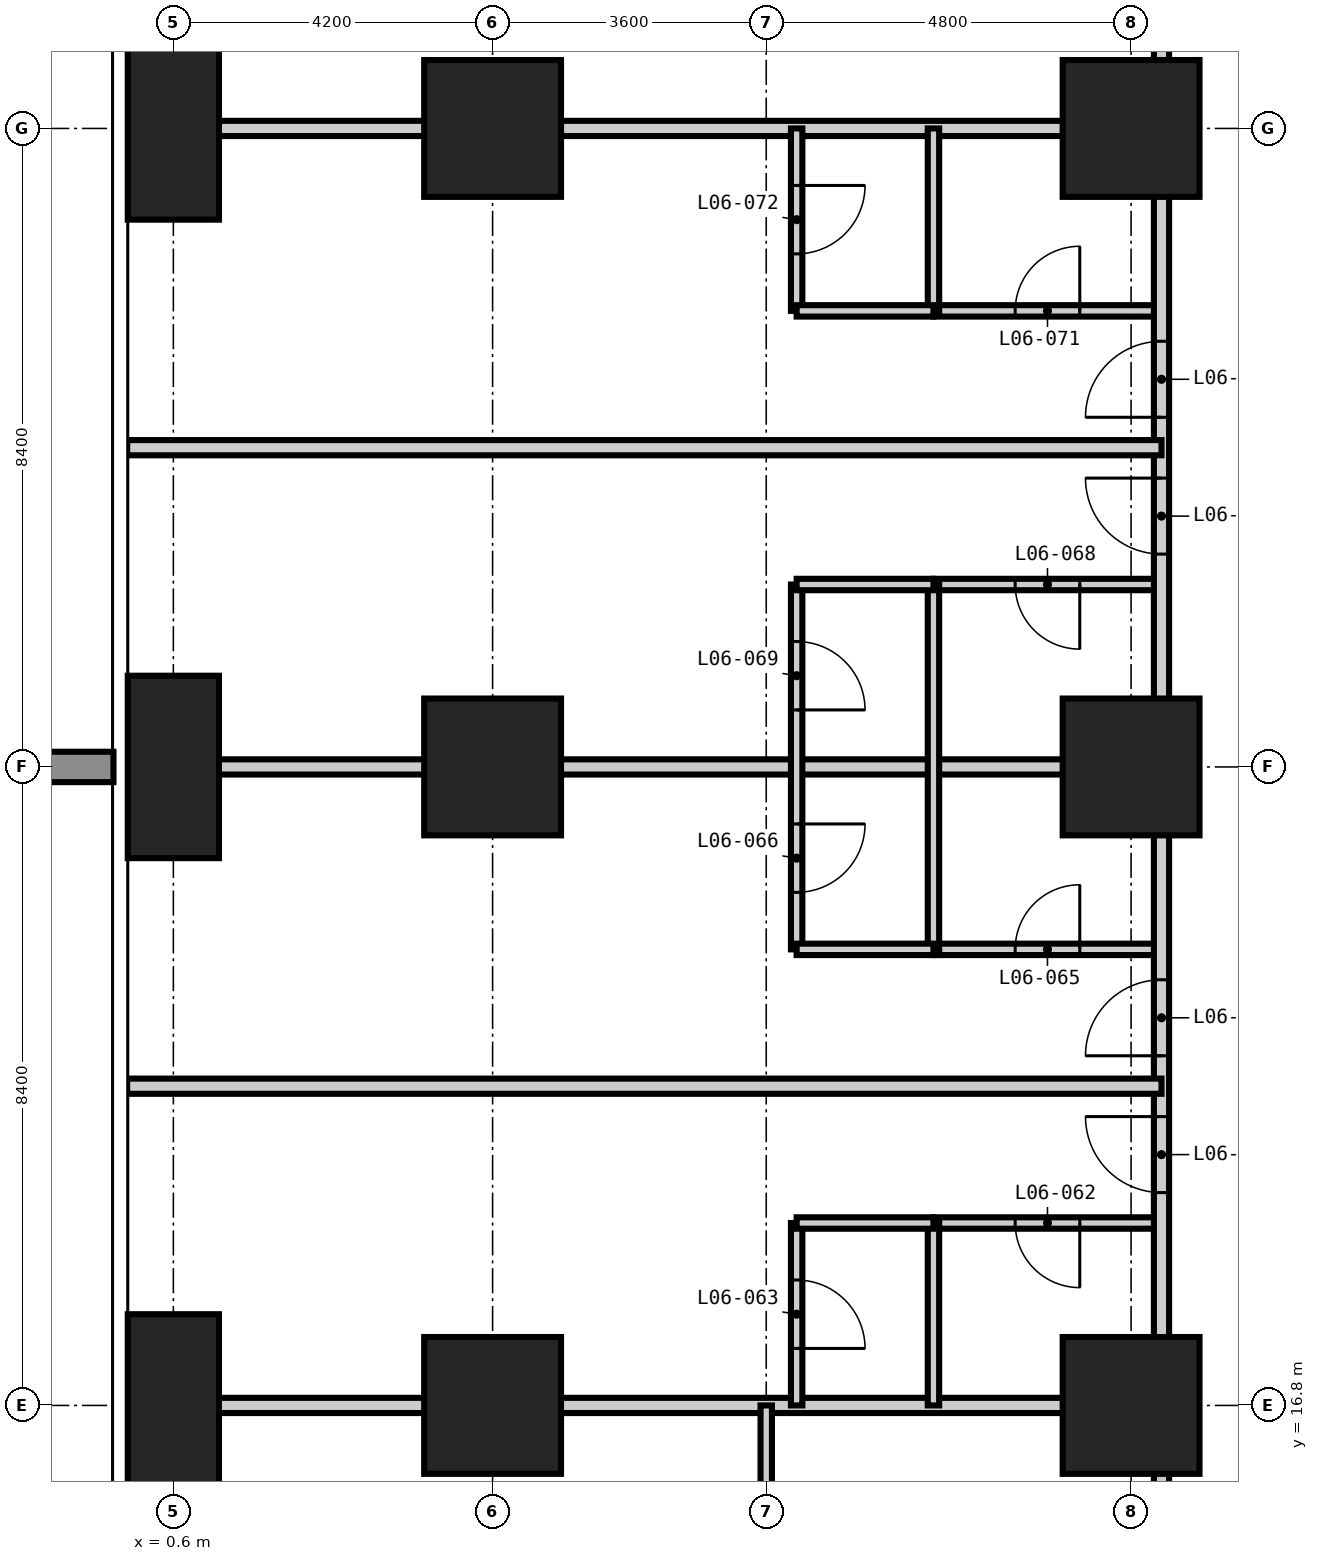
"""IFC4 building model, lengths in metres.
Left out: names, types, materials, properties, quantities, classifications, styles, units other than length and angle.
Written with IfcOpenShell. Run it as: python <this file> out.ifc"""

import sys

from ifc_helpers import new_model, si_unit, direction, frame, frame_2d, origin, origin_2d, place, context, subcontext, project, spatial, rectangle, extrude, element, fill, save


model = new_model("IFC4")
c1 = context("Model", 3, precision=1e-05, world=origin(), true_north=direction((0.0, 1.0)))
c2 = subcontext(c1, "Body", "Model", "MODEL_VIEW")
j1 = project(units=[si_unit("LENGTHUNIT", "METRE"), si_unit("PLANEANGLEUNIT", "RADIAN")], contexts=[c1])
p1 = place(None, origin())
s1 = spatial("IfcSite", under=j1, at=p1, CompositionType="ELEMENT")
p2 = place(p1, origin())
s2 = spatial("IfcBuilding", under=s1, at=p2, CompositionType="ELEMENT")
p3 = place(p2, frame((0.0, 0.0, 30.6)))
s3 = spatial("IfcBuildingStorey", under=s2, at=p3, CompositionType="ELEMENT", Elevation=30.6)
for number, where, z_axis, x_axis in (
    (1, (0.6, 16.8, -0.35), (0.0, 0.0, 1.0), (1.0, 0.0, 0.0)),
    (2, (0.6, 25.2, -0.35), (0.0, 0.0, 1.0), (1.0, 0.0, 0.0)),
    (3, (0.6, 33.6, -0.35), (0.0, 0.0, 1.0), (1.0, 0.0, 0.0)),
):
    element("IfcColumn", number, at=place(p3, frame(where, z_axis=z_axis, x_axis=x_axis)), inside=s3, PredefinedType="COLUMN", context=c2, shape_type="SweptSolid", body=[
        extrude(rectangle(XDim=1.2, YDim=2.4, at=origin_2d()), origin(), (0.0, 0.0, 1.0), 3.6),
    ])
for number, where, z_axis, x_axis in (
    (4, (4.8, 16.8, -0.35), (0.0, 0.0, 1.0), (1.0, 0.0, 0.0)),
    (5, (4.8, 25.2, -0.35), (0.0, 0.0, 1.0), (1.0, 0.0, 0.0)),
    (6, (4.8, 33.6, -0.35), (0.0, 0.0, 1.0), (1.0, 0.0, 0.0)),
    (7, (13.2, 16.8, -0.35), (0.0, 0.0, 1.0), (1.0, 0.0, 0.0)),
    (8, (13.2, 25.2, -0.35), (0.0, 0.0, 1.0), (1.0, 0.0, 0.0)),
    (9, (13.2, 33.6, -0.35), (0.0, 0.0, 1.0), (1.0, 0.0, 0.0)),
):
    element("IfcColumn", number, at=place(p3, frame(where, z_axis=z_axis, x_axis=x_axis)), inside=s3, PredefinedType="COLUMN", context=c2, shape_type="SweptSolid", body=[
        extrude(rectangle(XDim=1.8, YDim=1.8, at=origin_2d()), origin(), (0.0, 0.0, 1.0), 3.6),
    ])
p4 = place(p3, frame((10.6, 19.2, 0.0), z_axis=(0.0, 0.0, 1.0), x_axis=(1.0, 0.0, 0.0)))
e10 = element("IfcWall", 10, at=p4, inside=s3, PredefinedType="PARTITIONING", context=c2, shape_type="SweptSolid", body=[
    extrude(rectangle(XDim=3.0, YDim=0.15, at=frame_2d((1.5, 0.0))), origin(), (0.0, 0.0, 1.0), 3.25),
])
p5 = place(p4, frame((1.075, 0.0, 0.0)))
e11 = element("IfcOpeningElement", 11, at=p5, cuts=e10, PredefinedType="OPENING", context=c2, shape_type="SweptSolid", body=[
    extrude(rectangle(XDim=0.85, YDim=2.1, at=frame_2d((0.425, 1.05))), frame((0.0, 0.085, 0.0), z_axis=(0.0, -1.0, 0.0), x_axis=(1.0, 0.0, 0.0)), (0.0, 0.0, 1.0), 0.17),
])
p6 = place(p3, frame((10.6, 22.8, 0.0), z_axis=(0.0, 0.0, 1.0), x_axis=(1.0, 0.0, 0.0)))
e12 = element("IfcWall", 12, at=p6, inside=s3, PredefinedType="PARTITIONING", context=c2, shape_type="SweptSolid", body=[
    extrude(rectangle(XDim=3.0, YDim=0.15, at=frame_2d((1.5, 0.0))), origin(), (0.0, 0.0, 1.0), 3.25),
])
p7 = place(p6, frame((1.075, 0.0, 0.0)))
e13 = element("IfcOpeningElement", 13, at=p7, cuts=e12, PredefinedType="OPENING", context=c2, shape_type="SweptSolid", body=[
    extrude(rectangle(XDim=0.85, YDim=2.1, at=frame_2d((0.425, 1.05))), frame((0.0, 0.085, 0.0), z_axis=(0.0, -1.0, 0.0), x_axis=(1.0, 0.0, 0.0)), (0.0, 0.0, 1.0), 0.17),
])
p8 = place(p3, frame((10.6, 27.6, 0.0), z_axis=(0.0, 0.0, 1.0), x_axis=(1.0, 0.0, 0.0)))
e14 = element("IfcWall", 14, at=p8, inside=s3, PredefinedType="PARTITIONING", context=c2, shape_type="SweptSolid", body=[
    extrude(rectangle(XDim=3.0, YDim=0.15, at=frame_2d((1.5, 0.0))), origin(), (0.0, 0.0, 1.0), 3.25),
])
p9 = place(p8, frame((1.075, 0.0, 0.0)))
e15 = element("IfcOpeningElement", 15, at=p9, cuts=e14, PredefinedType="OPENING", context=c2, shape_type="SweptSolid", body=[
    extrude(rectangle(XDim=0.85, YDim=2.1, at=frame_2d((0.425, 1.05))), frame((0.0, 0.085, 0.0), z_axis=(0.0, -1.0, 0.0), x_axis=(1.0, 0.0, 0.0)), (0.0, 0.0, 1.0), 0.17),
])
p10 = place(p3, frame((10.6, 31.2, 0.0), z_axis=(0.0, 0.0, 1.0), x_axis=(1.0, 0.0, 0.0)))
e16 = element("IfcWall", 16, at=p10, inside=s3, PredefinedType="PARTITIONING", context=c2, shape_type="SweptSolid", body=[
    extrude(rectangle(XDim=3.0, YDim=0.15, at=frame_2d((1.5, 0.0))), origin(), (0.0, 0.0, 1.0), 3.25),
])
p11 = place(p10, frame((1.075, 0.0, 0.0)))
e17 = element("IfcOpeningElement", 17, at=p11, cuts=e16, PredefinedType="OPENING", context=c2, shape_type="SweptSolid", body=[
    extrude(rectangle(XDim=0.85, YDim=2.1, at=frame_2d((0.425, 1.05))), frame((0.0, 0.085, 0.0), z_axis=(0.0, -1.0, 0.0), x_axis=(1.0, 0.0, 0.0)), (0.0, 0.0, 1.0), 0.17),
])
p12 = place(p3, frame((13.6, 13.6, 0.0), z_axis=(0.0, 0.0, 1.0), x_axis=(0.0, 1.0, 0.0)))
e18 = element("IfcWall", 18, at=p12, inside=s3, PredefinedType="PARTITIONING", context=c2, shape_type="SweptSolid", body=[
    extrude(rectangle(XDim=20.0, YDim=0.2, at=frame_2d((10.0, 0.0))), origin(), (0.0, 0.0, 1.0), 3.25),
])
p13 = place(p12, frame((6.0, 0.0, 0.0)))
e19 = element("IfcOpeningElement", 19, at=p13, cuts=e18, PredefinedType="OPENING", context=c2, shape_type="SweptSolid", body=[
    extrude(rectangle(XDim=1.0, YDim=2.2, at=frame_2d((0.5, 1.1))), frame((0.0, 0.11, 0.0), z_axis=(0.0, -1.0, 0.0), x_axis=(1.0, 0.0, 0.0)), (0.0, 0.0, 1.0), 0.22),
])
p14 = place(p12, frame((7.8, 0.0, 0.0)))
e20 = element("IfcOpeningElement", 20, at=p14, cuts=e18, PredefinedType="OPENING", context=c2, shape_type="SweptSolid", body=[
    extrude(rectangle(XDim=1.0, YDim=2.2, at=frame_2d((0.5, 1.1))), frame((0.0, 0.11, 0.0), z_axis=(0.0, -1.0, 0.0), x_axis=(1.0, 0.0, 0.0)), (0.0, 0.0, 1.0), 0.22),
])
p15 = place(p12, frame((14.4, 0.0, 0.0)))
e21 = element("IfcOpeningElement", 21, at=p15, cuts=e18, PredefinedType="OPENING", context=c2, shape_type="SweptSolid", body=[
    extrude(rectangle(XDim=1.0, YDim=2.2, at=frame_2d((0.5, 1.1))), frame((0.0, 0.11, 0.0), z_axis=(0.0, -1.0, 0.0), x_axis=(1.0, 0.0, 0.0)), (0.0, 0.0, 1.0), 0.22),
])
p16 = place(p12, frame((16.2, 0.0, 0.0)))
e22 = element("IfcOpeningElement", 22, at=p16, cuts=e18, PredefinedType="OPENING", context=c2, shape_type="SweptSolid", body=[
    extrude(rectangle(XDim=1.0, YDim=2.2, at=frame_2d((0.5, 1.1))), frame((0.0, 0.11, 0.0), z_axis=(0.0, -1.0, 0.0), x_axis=(1.0, 0.0, 0.0)), (0.0, 0.0, 1.0), 0.22),
])
p17 = place(p12, frame((1.1, 0.0, 0.0)))
e23 = element("IfcOpeningElement", 23, at=p17, cuts=e18, PredefinedType="OPENING", context=c2, shape_type="SweptSolid", body=[
    extrude(rectangle(XDim=1.0, YDim=2.2, at=frame_2d((0.5, 1.1))), frame((0.0, 0.11, 0.0), z_axis=(0.0, -1.0, 0.0), x_axis=(1.0, 0.0, 0.0)), (0.0, 0.0, 1.0), 0.22),
])
p18 = place(p3, frame((13.6, 42.0, 0.0), z_axis=(0.0, 0.0, 1.0), x_axis=(0.0, -1.0, 0.0)))
e24 = element("IfcWall", 24, at=p18, inside=s3, PredefinedType="PARTITIONING", context=c2, shape_type="SweptSolid", body=[
    extrude(rectangle(XDim=8.4, YDim=0.2, at=frame_2d((4.2, 0.0))), origin(), (0.0, 0.0, 1.0), 3.25),
])
p19 = place(p18, frame((3.3, 0.0, 0.0)))
e25 = element("IfcOpeningElement", 25, at=p19, cuts=e24, PredefinedType="OPENING", context=c2, shape_type="SweptSolid", body=[
    extrude(rectangle(XDim=1.8, YDim=2.4, at=frame_2d((0.9, 1.2))), frame((0.0, 0.11, 0.0), z_axis=(0.0, -1.0, 0.0), x_axis=(1.0, 0.0, 0.0)), (0.0, 0.0, 1.0), 0.22),
])
for number, where, z_axis, x_axis in (
    (26, (-0.008, 16.8, 0.0), (0.0, 0.0, 1.0), (1.0, 0.0, 0.0)),
    (27, (-0.008, 21.0, 0.0), (0.0, 0.0, 1.0), (1.0, 0.0, 0.0)),
    (28, (-0.008, 25.2, 0.0), (0.0, 0.0, 1.0), (1.0, 0.0, 0.0)),
    (29, (-0.008, 29.4, 0.0), (0.0, 0.0, 1.0), (1.0, 0.0, 0.0)),
    (30, (-0.008, 33.6, 0.0), (0.0, 0.0, 1.0), (1.0, 0.0, 0.0)),
):
    element("IfcWall", number, at=place(p3, frame(where, z_axis=z_axis, x_axis=x_axis)), inside=s3, PredefinedType="PARTITIONING", context=c2, shape_type="SweptSolid", body=[
        extrude(rectangle(XDim=13.608, YDim=0.2, at=frame_2d((6.804, 0.0))), origin(), (0.0, 0.0, 1.0), 3.25),
    ])
p20 = place(p3, frame((8.4, -0.008, 0.0), z_axis=(0.0, 0.0, 1.0), x_axis=(0.0, 1.0, 0.0)))
e31 = element("IfcWall", 31, at=p20, inside=s3, PredefinedType="PARTITIONING", context=c2, shape_type="SweptSolid", body=[
    extrude(rectangle(XDim=16.808, YDim=0.15, at=frame_2d((8.404, 0.0))), origin(), (0.0, 0.0, 1.0), 3.25),
])
p21 = place(p20, frame((1.958, 0.0, 0.0)))
e32 = element("IfcOpeningElement", 32, at=p21, cuts=e31, PredefinedType="OPENING", context=c2, shape_type="SweptSolid", body=[
    extrude(rectangle(XDim=0.9, YDim=2.1, at=frame_2d((0.45, 1.05))), frame((0.0, 0.085, 0.0), z_axis=(0.0, -1.0, 0.0), x_axis=(1.0, 0.0, 0.0)), (0.0, 0.0, 1.0), 0.17),
])
p22 = place(p20, frame((12.158, 0.0, 0.0)))
e33 = element("IfcOpeningElement", 33, at=p22, cuts=e31, PredefinedType="OPENING", context=c2, shape_type="SweptSolid", body=[
    extrude(rectangle(XDim=0.9, YDim=2.1, at=frame_2d((0.45, 1.05))), frame((0.0, 0.085, 0.0), z_axis=(0.0, -1.0, 0.0), x_axis=(1.0, 0.0, 0.0)), (0.0, 0.0, 1.0), 0.17),
])
p23 = place(p3, frame((8.8, 16.8, 0.0), z_axis=(0.0, 0.0, 1.0), x_axis=(0.0, 1.0, 0.0)))
e34 = element("IfcWall", 34, at=p23, inside=s3, PredefinedType="PARTITIONING", context=c2, shape_type="SweptSolid", body=[
    extrude(rectangle(XDim=2.4, YDim=0.15, at=frame_2d((1.2, 0.0))), origin(), (0.0, 0.0, 1.0), 3.25),
])
p24 = place(p23, frame((0.75, 0.0, 0.0)))
e35 = element("IfcOpeningElement", 35, at=p24, cuts=e34, PredefinedType="OPENING", context=c2, shape_type="SweptSolid", body=[
    extrude(rectangle(XDim=0.9, YDim=2.1, at=frame_2d((0.45, 1.05))), frame((0.0, 0.085, 0.0), z_axis=(0.0, -1.0, 0.0), x_axis=(1.0, 0.0, 0.0)), (0.0, 0.0, 1.0), 0.17),
])
p25 = place(p3, frame((8.8, 22.8, 0.0), z_axis=(0.0, 0.0, 1.0), x_axis=(0.0, 1.0, 0.0)))
e36 = element("IfcWall", 36, at=p25, inside=s3, PredefinedType="PARTITIONING", context=c2, shape_type="SweptSolid", body=[
    extrude(rectangle(XDim=4.8, YDim=0.15, at=frame_2d((2.4, 0.0))), origin(), (0.0, 0.0, 1.0), 3.25),
])
p26 = place(p25, frame((0.75, 0.0, 0.0)))
e37 = element("IfcOpeningElement", 37, at=p26, cuts=e36, PredefinedType="OPENING", context=c2, shape_type="SweptSolid", body=[
    extrude(rectangle(XDim=0.9, YDim=2.1, at=frame_2d((0.45, 1.05))), frame((0.0, 0.085, 0.0), z_axis=(0.0, -1.0, 0.0), x_axis=(1.0, 0.0, 0.0)), (0.0, 0.0, 1.0), 0.17),
])
p27 = place(p25, frame((3.15, 0.0, 0.0)))
e38 = element("IfcOpeningElement", 38, at=p27, cuts=e36, PredefinedType="OPENING", context=c2, shape_type="SweptSolid", body=[
    extrude(rectangle(XDim=0.9, YDim=2.1, at=frame_2d((0.45, 1.05))), frame((0.0, 0.085, 0.0), z_axis=(0.0, -1.0, 0.0), x_axis=(1.0, 0.0, 0.0)), (0.0, 0.0, 1.0), 0.17),
])
p28 = place(p3, frame((8.8, 31.2, 0.0), z_axis=(0.0, 0.0, 1.0), x_axis=(0.0, 1.0, 0.0)))
e39 = element("IfcWall", 39, at=p28, inside=s3, PredefinedType="PARTITIONING", context=c2, shape_type="SweptSolid", body=[
    extrude(rectangle(XDim=2.4, YDim=0.15, at=frame_2d((1.2, 0.0))), origin(), (0.0, 0.0, 1.0), 3.25),
])
p29 = place(p28, frame((0.75, 0.0, 0.0)))
e40 = element("IfcOpeningElement", 40, at=p29, cuts=e39, PredefinedType="OPENING", context=c2, shape_type="SweptSolid", body=[
    extrude(rectangle(XDim=0.9, YDim=2.1, at=frame_2d((0.45, 1.05))), frame((0.0, 0.085, 0.0), z_axis=(0.0, -1.0, 0.0), x_axis=(1.0, 0.0, 0.0)), (0.0, 0.0, 1.0), 0.17),
])
p30 = place(p3, frame((10.6, 16.8, 0.0), z_axis=(0.0, 0.0, 1.0), x_axis=(0.0, 1.0, 0.0)))
e41 = element("IfcWall", 41, at=p30, inside=s3, PredefinedType="PARTITIONING", context=c2, shape_type="SweptSolid", body=[
    extrude(rectangle(XDim=2.4, YDim=0.15, at=frame_2d((1.2, 0.0))), origin(), (0.0, 0.0, 1.0), 3.25),
])
p31 = place(p3, frame((10.6, 22.8, 0.0), z_axis=(0.0, 0.0, 1.0), x_axis=(0.0, 1.0, 0.0)))
e42 = element("IfcWall", 42, at=p31, inside=s3, PredefinedType="PARTITIONING", context=c2, shape_type="SweptSolid", body=[
    extrude(rectangle(XDim=4.8, YDim=0.15, at=frame_2d((2.4, 0.0))), origin(), (0.0, 0.0, 1.0), 3.25),
])
p32 = place(p3, frame((10.6, 31.2, 0.0), z_axis=(0.0, 0.0, 1.0), x_axis=(0.0, 1.0, 0.0)))
e43 = element("IfcWall", 43, at=p32, inside=s3, PredefinedType="PARTITIONING", context=c2, shape_type="SweptSolid", body=[
    extrude(rectangle(XDim=2.4, YDim=0.15, at=frame_2d((1.2, 0.0))), origin(), (0.0, 0.0, 1.0), 3.25),
])
for number, where, z_axis, x_axis in (
    (44, (8.8, 19.2, 0.0), (0.0, 0.0, 1.0), (1.0, 0.0, 0.0)),
    (45, (8.8, 22.8, 0.0), (0.0, 0.0, 1.0), (1.0, 0.0, 0.0)),
    (46, (8.8, 27.6, 0.0), (0.0, 0.0, 1.0), (1.0, 0.0, 0.0)),
    (47, (8.8, 31.2, 0.0), (0.0, 0.0, 1.0), (1.0, 0.0, 0.0)),
):
    element("IfcWall", number, at=place(p3, frame(where, z_axis=z_axis, x_axis=x_axis)), inside=s3, PredefinedType="PARTITIONING", context=c2, shape_type="SweptSolid", body=[
        extrude(rectangle(XDim=1.8, YDim=0.15, at=frame_2d((0.9, 0.0))), origin(), (0.0, 0.0, 1.0), 3.25),
    ])
p33 = place(p13, origin())
e48 = element("IfcDoor", 48, at=p33, inside=s3, OperationType="SINGLE_SWING_RIGHT", PredefinedType="DOOR", context=c2, shape_type="SweptSolid", body=[
    extrude(rectangle(XDim=1.0, YDim=2.2, at=frame_2d((0.5, 1.1))), frame((0.0, 0.025, 0.0), z_axis=(0.0, -1.0, 0.0), x_axis=(1.0, 0.0, 0.0)), (0.0, 0.0, 1.0), 0.05),
])
fill(e19, e48)
p34 = place(p5, frame((0.85, 0.0, 0.0), z_axis=(0.0, 0.0, 1.0), x_axis=(-1.0, 0.0, 0.0)))
e49 = element("IfcDoor", 49, at=p34, inside=s3, OperationType="SINGLE_SWING_LEFT", PredefinedType="DOOR", context=c2, shape_type="SweptSolid", body=[
    extrude(rectangle(XDim=0.85, YDim=2.1, at=frame_2d((0.425, 1.05))), frame((0.0, 0.025, 0.0), z_axis=(0.0, -1.0, 0.0), x_axis=(1.0, 0.0, 0.0)), (0.0, 0.0, 1.0), 0.05),
])
fill(e11, e49)
p35 = place(p24, frame((0.9, 0.0, 0.0), z_axis=(0.0, 0.0, 1.0), x_axis=(-1.0, 0.0, 0.0)))
e50 = element("IfcDoor", 50, at=p35, inside=s3, OperationType="SINGLE_SWING_RIGHT", PredefinedType="DOOR", context=c2, shape_type="SweptSolid", body=[
    extrude(rectangle(XDim=0.9, YDim=2.1, at=frame_2d((0.45, 1.05))), frame((0.0, 0.025, 0.0), z_axis=(0.0, -1.0, 0.0), x_axis=(1.0, 0.0, 0.0)), (0.0, 0.0, 1.0), 0.05),
])
fill(e35, e50)
p36 = place(p14, origin())
e51 = element("IfcDoor", 51, at=p36, inside=s3, OperationType="SINGLE_SWING_LEFT", PredefinedType="DOOR", context=c2, shape_type="SweptSolid", body=[
    extrude(rectangle(XDim=1.0, YDim=2.2, at=frame_2d((0.5, 1.1))), frame((0.0, 0.025, 0.0), z_axis=(0.0, -1.0, 0.0), x_axis=(1.0, 0.0, 0.0)), (0.0, 0.0, 1.0), 0.05),
])
fill(e20, e51)
p37 = place(p7, origin())
e52 = element("IfcDoor", 52, at=p37, inside=s3, OperationType="SINGLE_SWING_RIGHT", PredefinedType="DOOR", context=c2, shape_type="SweptSolid", body=[
    extrude(rectangle(XDim=0.85, YDim=2.1, at=frame_2d((0.425, 1.05))), frame((0.0, 0.025, 0.0), z_axis=(0.0, -1.0, 0.0), x_axis=(1.0, 0.0, 0.0)), (0.0, 0.0, 1.0), 0.05),
])
fill(e13, e52)
p38 = place(p26, frame((0.9, 0.0, 0.0), z_axis=(0.0, 0.0, 1.0), x_axis=(-1.0, 0.0, 0.0)))
e53 = element("IfcDoor", 53, at=p38, inside=s3, OperationType="SINGLE_SWING_LEFT", PredefinedType="DOOR", context=c2, shape_type="SweptSolid", body=[
    extrude(rectangle(XDim=0.9, YDim=2.1, at=frame_2d((0.45, 1.05))), frame((0.0, 0.025, 0.0), z_axis=(0.0, -1.0, 0.0), x_axis=(1.0, 0.0, 0.0)), (0.0, 0.0, 1.0), 0.05),
])
fill(e37, e53)
p39 = place(p15, origin())
e54 = element("IfcDoor", 54, at=p39, inside=s3, OperationType="SINGLE_SWING_RIGHT", PredefinedType="DOOR", context=c2, shape_type="SweptSolid", body=[
    extrude(rectangle(XDim=1.0, YDim=2.2, at=frame_2d((0.5, 1.1))), frame((0.0, 0.025, 0.0), z_axis=(0.0, -1.0, 0.0), x_axis=(1.0, 0.0, 0.0)), (0.0, 0.0, 1.0), 0.05),
])
fill(e21, e54)
p40 = place(p9, frame((0.85, 0.0, 0.0), z_axis=(0.0, 0.0, 1.0), x_axis=(-1.0, 0.0, 0.0)))
e55 = element("IfcDoor", 55, at=p40, inside=s3, OperationType="SINGLE_SWING_LEFT", PredefinedType="DOOR", context=c2, shape_type="SweptSolid", body=[
    extrude(rectangle(XDim=0.85, YDim=2.1, at=frame_2d((0.425, 1.05))), frame((0.0, 0.025, 0.0), z_axis=(0.0, -1.0, 0.0), x_axis=(1.0, 0.0, 0.0)), (0.0, 0.0, 1.0), 0.05),
])
fill(e15, e55)
p41 = place(p27, frame((0.9, 0.0, 0.0), z_axis=(0.0, 0.0, 1.0), x_axis=(-1.0, 0.0, 0.0)))
e56 = element("IfcDoor", 56, at=p41, inside=s3, OperationType="SINGLE_SWING_RIGHT", PredefinedType="DOOR", context=c2, shape_type="SweptSolid", body=[
    extrude(rectangle(XDim=0.9, YDim=2.1, at=frame_2d((0.45, 1.05))), frame((0.0, 0.025, 0.0), z_axis=(0.0, -1.0, 0.0), x_axis=(1.0, 0.0, 0.0)), (0.0, 0.0, 1.0), 0.05),
])
fill(e38, e56)
p42 = place(p16, origin())
e57 = element("IfcDoor", 57, at=p42, inside=s3, OperationType="SINGLE_SWING_LEFT", PredefinedType="DOOR", context=c2, shape_type="SweptSolid", body=[
    extrude(rectangle(XDim=1.0, YDim=2.2, at=frame_2d((0.5, 1.1))), frame((0.0, 0.025, 0.0), z_axis=(0.0, -1.0, 0.0), x_axis=(1.0, 0.0, 0.0)), (0.0, 0.0, 1.0), 0.05),
])
fill(e22, e57)
p43 = place(p11, origin())
e58 = element("IfcDoor", 58, at=p43, inside=s3, OperationType="SINGLE_SWING_RIGHT", PredefinedType="DOOR", context=c2, shape_type="SweptSolid", body=[
    extrude(rectangle(XDim=0.85, YDim=2.1, at=frame_2d((0.425, 1.05))), frame((0.0, 0.025, 0.0), z_axis=(0.0, -1.0, 0.0), x_axis=(1.0, 0.0, 0.0)), (0.0, 0.0, 1.0), 0.05),
])
fill(e17, e58)
p44 = place(p29, frame((0.9, 0.0, 0.0), z_axis=(0.0, 0.0, 1.0), x_axis=(-1.0, 0.0, 0.0)))
e59 = element("IfcDoor", 59, at=p44, inside=s3, OperationType="SINGLE_SWING_LEFT", PredefinedType="DOOR", context=c2, shape_type="SweptSolid", body=[
    extrude(rectangle(XDim=0.9, YDim=2.1, at=frame_2d((0.45, 1.05))), frame((0.0, 0.025, 0.0), z_axis=(0.0, -1.0, 0.0), x_axis=(1.0, 0.0, 0.0)), (0.0, 0.0, 1.0), 0.05),
])
fill(e40, e59)
save(model, sys.argv[1])
